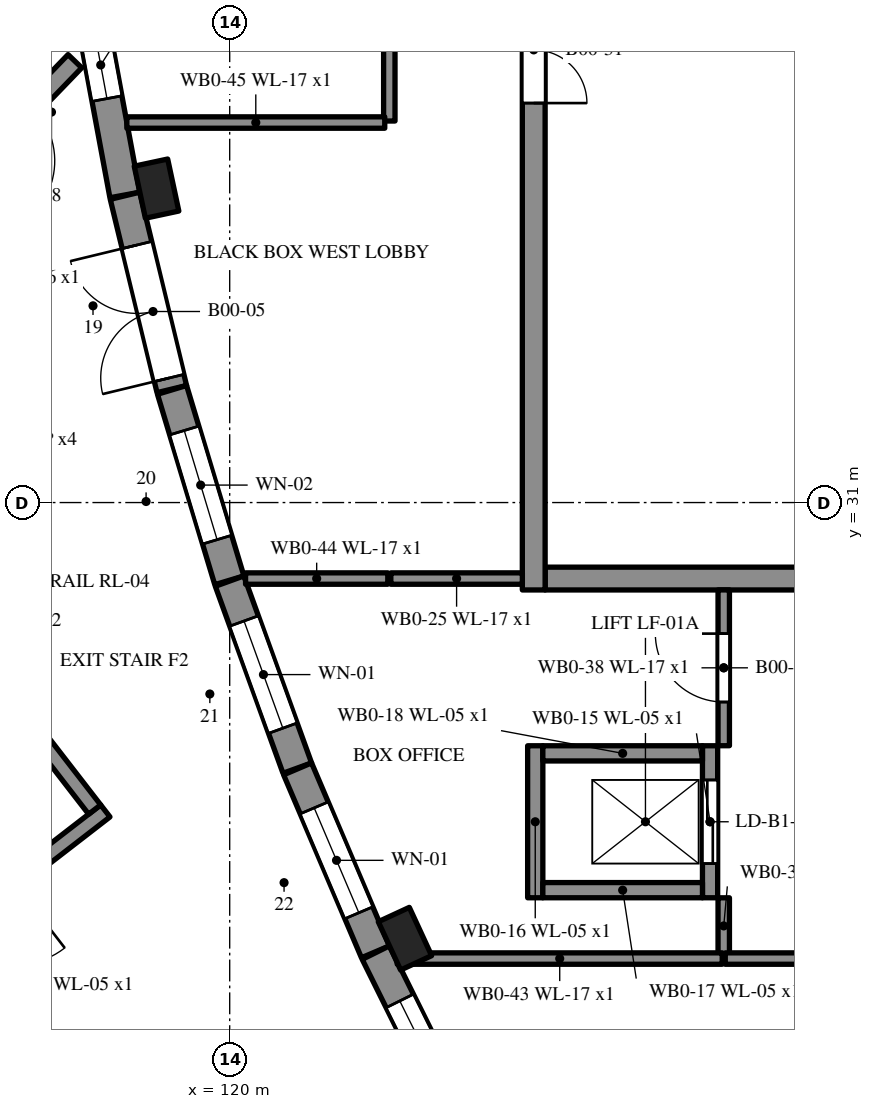
"""IFC4 building model, lengths in metres.
Left out: names, types, materials, properties, quantities, classifications, styles, units other than length and angle.
Written with IfcOpenShell. Run it as: python <this file> out.ifc"""

import sys

from ifc_helpers import new_model, si_unit, direction, frame, frame_2d, origin, origin_2d, place, context, subcontext, project, spatial, rectangle, extrude, element, fill, save


model = new_model("IFC4")
c1 = context("Model", 3, precision=1e-05, world=origin(), true_north=direction((0.0, 1.0)))
c2 = subcontext(c1, "Body", "Model", "MODEL_VIEW")
j1 = project(units=[si_unit("LENGTHUNIT", "METRE"), si_unit("PLANEANGLEUNIT", "RADIAN")], contexts=[c1])
p1 = place(None, origin())
s1 = spatial("IfcSite", under=j1, at=p1, CompositionType="ELEMENT")
p2 = place(p1, origin())
s2 = spatial("IfcBuilding", under=s1, at=p2, CompositionType="ELEMENT")
p3 = place(p2, origin())
s3 = spatial("IfcBuildingStorey", under=s2, at=p3, CompositionType="ELEMENT", Elevation=0.0)
p4 = place(p3, frame((118.165, 37.502, 0.0), z_axis=(0.0, 0.0, 1.0), x_axis=(0.182652956339, -0.983177449671, 0.0)))
e1 = element("IfcWall", 1, at=p4, inside=s3, PredefinedType="SOLIDWALL", context=c2, shape_type="SweptSolid", body=[
    extrude(rectangle(XDim=2.497, YDim=0.4, at=frame_2d((1.249, 0.0))), origin(), (0.0, 0.0, 1.0), 5.1),
])
p5 = place(p4, frame((0.307, 0.0, 0.9)))
e2 = element("IfcOpeningElement", 2, at=p5, cuts=e1, PredefinedType="OPENING", context=c2, shape_type="SweptSolid", body=[
    extrude(rectangle(XDim=0.9, YDim=2.1, at=frame_2d((0.45, 1.05))), frame((0.0, 0.21, 0.0), z_axis=(0.0, -1.0, 0.0), x_axis=(1.0, 0.0, 0.0)), (0.0, 0.0, 1.0), 0.42),
])
p6 = place(p3, frame((118.623, 35.037, 0.0), z_axis=(0.0, 0.0, 1.0), x_axis=(0.235108668597, -0.971969091047, 0.0)))
e3 = element("IfcWall", 3, at=p6, inside=s3, PredefinedType="SOLIDWALL", context=c2, shape_type="SweptSolid", body=[
    extrude(rectangle(XDim=2.617, YDim=0.4, at=frame_2d((1.308, 0.0))), origin(), (0.0, 0.0, 1.0), 5.1),
])
p7 = place(p6, frame((0.667, 0.0, 0.0)))
e4 = element("IfcOpeningElement", 4, at=p7, cuts=e3, PredefinedType="OPENING", context=c2, shape_type="SweptSolid", body=[
    extrude(rectangle(XDim=1.8, YDim=2.1, at=frame_2d((0.9, 1.05))), frame((0.0, 0.21, 0.0), z_axis=(0.0, -1.0, 0.0), x_axis=(1.0, 0.0, 0.0)), (0.0, 0.0, 1.0), 0.42),
])
p8 = place(p3, frame((119.241, 32.483, 0.0), z_axis=(0.0, 0.0, 1.0), x_axis=(0.288212317298, -0.957566530408, 0.0)))
e5 = element("IfcWall", 5, at=p8, inside=s3, PredefinedType="SOLIDWALL", context=c2, shape_type="SweptSolid", body=[
    extrude(rectangle(XDim=2.617, YDim=0.4, at=frame_2d((1.308, 0.0))), origin(), (0.0, 0.0, 1.0), 5.1),
])
p9 = place(p8, frame((0.558, 0.0, 0.3)))
e6 = element("IfcOpeningElement", 6, at=p9, cuts=e5, PredefinedType="OPENING", context=c2, shape_type="SweptSolid", body=[
    extrude(rectangle(XDim=1.5, YDim=2.7, at=frame_2d((0.75, 1.35))), frame((0.0, 0.21, 0.0), z_axis=(0.0, -1.0, 0.0), x_axis=(1.0, 0.0, 0.0)), (0.0, 0.0, 1.0), 0.42),
])
p10 = place(p3, frame((119.999, 29.967, 0.0), z_axis=(0.0, 0.0, 1.0), x_axis=(0.340394146267, -0.940282843184, 0.0)))
e7 = element("IfcWall", 7, at=p10, inside=s3, PredefinedType="SOLIDWALL", context=c2, shape_type="SweptSolid", body=[
    extrude(rectangle(XDim=2.616, YDim=0.4, at=frame_2d((1.308, 0.0))), origin(), (0.0, 0.0, 1.0), 5.1),
])
p11 = place(p10, frame((0.558, 0.0, 0.9)))
e8 = element("IfcOpeningElement", 8, at=p11, cuts=e7, PredefinedType="OPENING", context=c2, shape_type="SweptSolid", body=[
    extrude(rectangle(XDim=1.5, YDim=2.1, at=frame_2d((0.75, 1.05))), frame((0.0, 0.21, 0.0), z_axis=(0.0, -1.0, 0.0), x_axis=(1.0, 0.0, 0.0)), (0.0, 0.0, 1.0), 0.42),
])
p12 = place(p3, frame((120.893, 27.496, 0.0), z_axis=(0.0, 0.0, 1.0), x_axis=(0.391529943778, -0.920165367271, 0.0)))
e9 = element("IfcWall", 9, at=p12, inside=s3, PredefinedType="SOLIDWALL", context=c2, shape_type="SweptSolid", body=[
    extrude(rectangle(XDim=2.616, YDim=0.4, at=frame_2d((1.308, 0.0))), origin(), (0.0, 0.0, 1.0), 5.1),
])
p13 = place(p12, frame((0.558, 0.0, 0.9)))
e10 = element("IfcOpeningElement", 10, at=p13, cuts=e9, PredefinedType="OPENING", context=c2, shape_type="SweptSolid", body=[
    extrude(rectangle(XDim=1.5, YDim=2.1, at=frame_2d((0.75, 1.05))), frame((0.0, 0.21, 0.0), z_axis=(0.0, -1.0, 0.0), x_axis=(1.0, 0.0, 0.0)), (0.0, 0.0, 1.0), 0.42),
])
p14 = place(p3, frame((121.922, 25.078, 0.0), z_axis=(0.0, 0.0, 1.0), x_axis=(0.44433489597, -0.895860759395, 0.0)))
e11 = element("IfcWall", 11, at=p14, inside=s3, PredefinedType="SOLIDWALL", context=c2, shape_type="SweptSolid", body=[
    extrude(rectangle(XDim=2.92, YDim=0.4, at=frame_2d((1.46, 0.0))), origin(), (0.0, 0.0, 1.0), 5.1),
])
p15 = place(p14, frame((0.71, 0.0, 2.4)))
e12 = element("IfcOpeningElement", 12, at=p15, cuts=e11, PredefinedType="OPENING", context=c2, shape_type="SweptSolid", body=[
    extrude(rectangle(XDim=1.5, YDim=0.9, at=frame_2d((0.75, 0.45))), frame((0.0, 0.21, 0.0), z_axis=(0.0, -1.0, 0.0), x_axis=(1.0, 0.0, 0.0)), (0.0, 0.0, 1.0), 0.42),
])
for number, where, z_axis, x_axis in (
    (13, (122.306, 25.261, 0.0), (0.0, 0.0, 1.0), (0.42, -0.908, 0.0)),
    (14, (119.037, 35.131, 0.0), (0.0, 0.0, 1.0), (0.21, -0.978, 0.0)),
):
    element("IfcColumn", number, at=place(p3, frame(where, z_axis=z_axis, x_axis=x_axis)), inside=s3, PredefinedType="PILASTER", context=c2, shape_type="SweptSolid", body=[
        extrude(rectangle(XDim=0.7, YDim=0.45, at=origin_2d()), origin(), (0.0, 0.0, 1.0), 5.1),
    ])
p16 = place(p3, frame((139.85, 30.0, 0.0), z_axis=(0.0, 0.0, 1.0), x_axis=(-1.0, 0.0, 0.0)))
e15 = element("IfcWall", 15, at=p16, inside=s3, PredefinedType="SHEAR", context=c2, shape_type="SweptSolid", body=[
    extrude(rectangle(XDim=15.7, YDim=0.3, at=frame_2d((7.85, 0.0))), origin(), (0.0, 0.0, 1.0), 5.1),
])
p17 = place(p16, frame((6.95, 0.0, 0.0)))
e16 = element("IfcOpeningElement", 16, at=p17, cuts=e15, PredefinedType="OPENING", context=c2, shape_type="SweptSolid", body=[
    extrude(rectangle(XDim=1.8, YDim=2.1, at=frame_2d((0.9, 1.05))), frame((0.0, 0.16, 0.0), z_axis=(0.0, -1.0, 0.0), x_axis=(1.0, 0.0, 0.0)), (0.0, 0.0, 1.0), 0.32),
])
p18 = place(p3, frame((124.0, 62.15, 0.0), z_axis=(0.0, 0.0, 1.0), x_axis=(0.0, -1.0, 0.0)))
e17 = element("IfcWall", 17, at=p18, inside=s3, PredefinedType="SHEAR", context=c2, shape_type="SweptSolid", body=[
    extrude(rectangle(XDim=32.3, YDim=0.3, at=frame_2d((16.15, 0.0))), origin(), (0.0, 0.0, 1.0), 5.1),
])
p19 = place(p18, frame((6.406, 0.0, 0.0)))
e18 = element("IfcOpeningElement", 18, at=p19, cuts=e17, PredefinedType="OPENING", context=c2, shape_type="SweptSolid", body=[
    extrude(rectangle(XDim=1.4, YDim=2.1, at=frame_2d((0.7, 1.05))), frame((0.0, 0.16, 0.0), z_axis=(0.0, -1.0, 0.0), x_axis=(1.0, 0.0, 0.0)), (0.0, 0.0, 1.0), 0.32),
])
p20 = place(p18, frame((24.494, 0.0, 0.0)))
e19 = element("IfcOpeningElement", 19, at=p20, cuts=e17, PredefinedType="OPENING", context=c2, shape_type="SweptSolid", body=[
    extrude(rectangle(XDim=1.4, YDim=2.1, at=frame_2d((0.7, 1.05))), frame((0.0, 0.16, 0.0), z_axis=(0.0, -1.0, 0.0), x_axis=(1.0, 0.0, 0.0)), (0.0, 0.0, 1.0), 0.32),
])
p21 = place(p3, frame((126.32, 25.8, -1.2), z_axis=(0.0, 0.0, 1.0), x_axis=(0.0, 1.0, 0.0)))
e20 = element("IfcWall", 20, at=p21, inside=s3, PredefinedType="SHEAR", context=c2, shape_type="SweptSolid", body=[
    extrude(rectangle(XDim=2.0, YDim=0.2, at=frame_2d((1.0, 0.0))), origin(), (0.0, 0.0, 1.0), 6.3),
])
p22 = place(p21, frame((0.45, 0.0, 1.2)))
e21 = element("IfcOpeningElement", 21, at=p22, cuts=e20, PredefinedType="OPENING", context=c2, shape_type="SweptSolid", body=[
    extrude(rectangle(XDim=1.1, YDim=2.2, at=frame_2d((0.55, 1.1))), frame((0.0, 0.11, 0.0), z_axis=(0.0, -1.0, 0.0), x_axis=(1.0, 0.0, 0.0)), (0.0, 0.0, 1.0), 0.22),
])
p23 = place(p3, frame((124.02, 27.8, -1.2), z_axis=(0.0, 0.0, 1.0), x_axis=(0.0, -1.0, 0.0)))
e22 = element("IfcWall", 22, at=p23, inside=s3, PredefinedType="SHEAR", context=c2, shape_type="SweptSolid", body=[
    extrude(rectangle(XDim=2.0, YDim=0.2, at=frame_2d((1.0, 0.0))), origin(), (0.0, 0.0, 1.0), 6.3),
])
for number, where, z_axis, x_axis in (
    (23, (124.12, 25.9, -1.2), (0.0, 0.0, 1.0), (1.0, 0.0, 0.0)),
    (24, (126.22, 27.7, -1.2), (0.0, 0.0, 1.0), (-1.0, 0.0, 0.0)),
):
    element("IfcWall", number, at=place(p3, frame(where, z_axis=z_axis, x_axis=x_axis)), inside=s3, PredefinedType="SHEAR", context=c2, shape_type="SweptSolid", body=[
        extrude(rectangle(XDim=2.1, YDim=0.2, at=frame_2d((1.05, 0.0))), origin(), (0.0, 0.0, 1.0), 6.3),
    ])
p24 = place(p3, frame((117.963, 36.807, 0.0), z_axis=(0.0, 0.0, 1.0), x_axis=(-0.694251740415, -0.71973225642, 0.0)))
e25 = element("IfcWall", 25, at=p24, inside=s3, PredefinedType="SHEAR", context=c2, shape_type="SweptSolid", body=[
    extrude(rectangle(XDim=2.645, YDim=0.25, at=frame_2d((1.322, 0.0))), origin(), (0.0, 0.0, 1.0), 5.4),
])
p25 = place(p24, frame((0.822, 0.0, 0.0)))
e26 = element("IfcOpeningElement", 26, at=p25, cuts=e25, PredefinedType="OPENING", context=c2, shape_type="SweptSolid", body=[
    extrude(rectangle(XDim=1.0, YDim=2.1, at=frame_2d((0.5, 1.05))), frame((0.0, 0.135, 0.0), z_axis=(0.0, -1.0, 0.0), x_axis=(1.0, 0.0, 0.0)), (0.0, 0.0, 1.0), 0.27),
])
p26 = place(p3, frame((123.851, 30.0, 0.0), z_axis=(0.0, 0.0, 1.0), x_axis=(-1.0, 0.0, 0.0)))
e27 = element("IfcWall", 27, at=p26, inside=s3, PredefinedType="PARTITIONING", context=c2, shape_type="SweptSolid", body=[
    extrude(rectangle(XDim=1.73, YDim=0.15, at=frame_2d((0.865, 0.0))), origin(), (0.0, 0.0, 1.0), 5.1),
])
p27 = place(p3, frame((122.1, 36.02, 0.0), z_axis=(0.0, 0.0, 1.0), x_axis=(0.0, 1.0, 0.0)))
e28 = element("IfcWall", 28, at=p27, inside=s3, PredefinedType="PARTITIONING", context=c2, shape_type="SweptSolid", body=[
    extrude(rectangle(XDim=4.46, YDim=0.15, at=frame_2d((2.23, 0.0))), origin(), (0.0, 0.0, 1.0), 5.1),
])
p28 = place(p27, frame((1.78, 0.0, 0.0)))
e29 = element("IfcOpeningElement", 29, at=p28, cuts=e28, PredefinedType="OPENING", context=c2, shape_type="SweptSolid", body=[
    extrude(rectangle(XDim=0.9, YDim=2.1, at=frame_2d((0.45, 1.05))), frame((0.0, 0.085, 0.0), z_axis=(0.0, -1.0, 0.0), x_axis=(1.0, 0.0, 0.0)), (0.0, 0.0, 1.0), 0.17),
])
p29 = place(p3, frame((126.5, 25.06, 0.0), z_axis=(0.0, 0.0, 1.0), x_axis=(0.0, 1.0, 0.0)))
e30 = element("IfcWall", 30, at=p29, inside=s3, PredefinedType="PARTITIONING", context=c2, shape_type="SweptSolid", body=[
    extrude(rectangle(XDim=0.74, YDim=0.15, at=frame_2d((0.37, 0.0))), origin(), (0.0, 0.0, 1.0), 5.1),
])
p30 = place(p3, frame((126.5, 27.801, 0.0), z_axis=(0.0, 0.0, 1.0), x_axis=(0.0, 1.0, 0.0)))
e31 = element("IfcWall", 31, at=p30, inside=s3, PredefinedType="PARTITIONING", context=c2, shape_type="SweptSolid", body=[
    extrude(rectangle(XDim=2.05, YDim=0.15, at=frame_2d((1.025, 0.0))), origin(), (0.0, 0.0, 1.0), 5.1),
])
p31 = place(p30, frame((0.575, 0.0, 0.0)))
e32 = element("IfcOpeningElement", 32, at=p31, cuts=e31, PredefinedType="OPENING", context=c2, shape_type="SweptSolid", body=[
    extrude(rectangle(XDim=0.9, YDim=2.1, at=frame_2d((0.45, 1.05))), frame((0.0, 0.085, 0.0), z_axis=(0.0, -1.0, 0.0), x_axis=(1.0, 0.0, 0.0)), (0.0, 0.0, 1.0), 0.17),
])
p32 = place(p3, frame((129.65, 25.0, 0.0), z_axis=(0.0, 0.0, 1.0), x_axis=(-1.0, 0.0, 0.0)))
e33 = element("IfcWall", 33, at=p32, inside=s3, PredefinedType="PARTITIONING", context=c2, shape_type="SweptSolid", body=[
    extrude(rectangle(XDim=3.13, YDim=0.15, at=frame_2d((1.565, 0.0))), origin(), (0.0, 0.0, 1.0), 5.1),
])
p33 = place(p32, frame((1.065, 0.0, 0.0)))
e34 = element("IfcOpeningElement", 34, at=p33, cuts=e33, PredefinedType="OPENING", context=c2, shape_type="SweptSolid", body=[
    extrude(rectangle(XDim=1.0, YDim=2.1, at=frame_2d((0.5, 1.05))), frame((0.0, 0.085, 0.0), z_axis=(0.0, -1.0, 0.0), x_axis=(1.0, 0.0, 0.0)), (0.0, 0.0, 1.0), 0.17),
])
p34 = place(p3, frame((126.48, 25.0, 0.0), z_axis=(0.0, 0.0, 1.0), x_axis=(-1.0, 0.0, 0.0)))
e35 = element("IfcWall", 35, at=p34, inside=s3, PredefinedType="PARTITIONING", context=c2, shape_type="SweptSolid", body=[
    extrude(rectangle(XDim=4.276, YDim=0.15, at=frame_2d((2.138, 0.0))), origin(), (0.0, 0.0, 1.0), 5.1),
])
p35 = place(p3, frame((120.209, 30.0, 0.0), z_axis=(0.0, 0.0, 1.0), x_axis=(1.0, 0.0, 0.0)))
e36 = element("IfcWall", 36, at=p35, inside=s3, PredefinedType="PARTITIONING", context=c2, shape_type="SweptSolid", body=[
    extrude(rectangle(XDim=1.871, YDim=0.15, at=frame_2d((0.936, 0.0))), origin(), (0.0, 0.0, 1.0), 5.1),
])
p36 = place(p3, frame((118.647, 36.0, 0.0), z_axis=(0.0, 0.0, 1.0), x_axis=(1.0, 0.0, 0.0)))
e37 = element("IfcWall", 37, at=p36, inside=s3, PredefinedType="PARTITIONING", context=c2, shape_type="SweptSolid", body=[
    extrude(rectangle(XDim=3.393, YDim=0.15, at=frame_2d((1.697, 0.0))), origin(), (0.0, 0.0, 1.0), 5.1),
])
p37 = place(p3, frame((118.364, 26.943, 0.0), z_axis=(0.0, 0.0, 1.0), x_axis=(-0.791154317501, -0.611616584062, 0.0)))
e38 = element("IfcWall", 38, at=p37, inside=s3, PredefinedType="SHEAR", context=c2, shape_type="SweptSolid", body=[
    extrude(rectangle(XDim=4.15, YDim=0.2, at=frame_2d((2.075, 0.0))), origin(), (0.0, 0.0, 1.0), 5.4),
])
p38 = place(p37, frame((1.525, 0.0, 0.0)))
e39 = element("IfcOpeningElement", 39, at=p38, cuts=e38, PredefinedType="OPENING", context=c2, shape_type="SweptSolid", body=[
    extrude(rectangle(XDim=1.1, YDim=2.1, at=frame_2d((0.55, 1.05))), frame((0.0, 0.11, 0.0), z_axis=(0.0, -1.0, 0.0), x_axis=(1.0, 0.0, 0.0)), (0.0, 0.0, 1.0), 0.22),
])
p39 = place(p3, frame((118.223, 26.961, 0.0), z_axis=(0.0, 0.0, 1.0), x_axis=(-0.61163509056, 0.791140010362, 0.0)))
e40 = element("IfcWall", 40, at=p39, inside=s3, PredefinedType="SHEAR", context=c2, shape_type="SweptSolid", body=[
    extrude(rectangle(XDim=8.0, YDim=0.2, at=frame_2d((4.0, 0.0))), origin(), (0.0, 0.0, 1.0), 5.4),
])
p40 = place(p7, frame((1.8, 0.0, 0.0), z_axis=(0.0, 0.0, 1.0), x_axis=(-1.0, 0.0, 0.0)))
e41 = element("IfcDoor", 41, at=p40, inside=s3, OperationType="DOUBLE_DOOR_SINGLE_SWING", PredefinedType="DOOR", context=c2, shape_type="SweptSolid", body=[
    extrude(rectangle(XDim=1.8, YDim=2.1, at=frame_2d((0.9, 1.05))), frame((0.0, 0.025, 0.0), z_axis=(0.0, -1.0, 0.0), x_axis=(1.0, 0.0, 0.0)), (0.0, 0.0, 1.0), 0.05),
])
fill(e4, e41)
p41 = place(p5, origin())
e42 = element("IfcWindow", 42, at=p41, inside=s3, PartitioningType="SINGLE_PANEL", PredefinedType="WINDOW", context=c2, shape_type="SweptSolid", body=[
    extrude(rectangle(XDim=0.9, YDim=2.1, at=frame_2d((0.45, 1.05))), frame((0.0, 0.03, 0.0), z_axis=(0.0, -1.0, 0.0), x_axis=(1.0, 0.0, 0.0)), (0.0, 0.0, 1.0), 0.06),
])
fill(e2, e42)
p42 = place(p9, origin())
e43 = element("IfcWindow", 43, at=p42, inside=s3, PartitioningType="SINGLE_PANEL", PredefinedType="WINDOW", context=c2, shape_type="SweptSolid", body=[
    extrude(rectangle(XDim=1.5, YDim=2.7, at=frame_2d((0.75, 1.35))), frame((0.0, 0.03, 0.0), z_axis=(0.0, -1.0, 0.0), x_axis=(1.0, 0.0, 0.0)), (0.0, 0.0, 1.0), 0.06),
])
fill(e6, e43)
p43 = place(p11, origin())
e44 = element("IfcWindow", 44, at=p43, inside=s3, PartitioningType="SINGLE_PANEL", PredefinedType="WINDOW", context=c2, shape_type="SweptSolid", body=[
    extrude(rectangle(XDim=1.5, YDim=2.1, at=frame_2d((0.75, 1.05))), frame((0.0, 0.03, 0.0), z_axis=(0.0, -1.0, 0.0), x_axis=(1.0, 0.0, 0.0)), (0.0, 0.0, 1.0), 0.06),
])
fill(e8, e44)
p44 = place(p13, origin())
e45 = element("IfcWindow", 45, at=p44, inside=s3, PartitioningType="SINGLE_PANEL", PredefinedType="WINDOW", context=c2, shape_type="SweptSolid", body=[
    extrude(rectangle(XDim=1.5, YDim=2.1, at=frame_2d((0.75, 1.05))), frame((0.0, 0.03, 0.0), z_axis=(0.0, -1.0, 0.0), x_axis=(1.0, 0.0, 0.0)), (0.0, 0.0, 1.0), 0.06),
])
fill(e10, e45)
p45 = place(p15, origin())
e46 = element("IfcWindow", 46, at=p45, inside=s3, PartitioningType="SINGLE_PANEL", PredefinedType="WINDOW", context=c2, shape_type="SweptSolid", body=[
    extrude(rectangle(XDim=1.5, YDim=0.9, at=frame_2d((0.75, 0.45))), frame((0.0, 0.03, 0.0), z_axis=(0.0, -1.0, 0.0), x_axis=(1.0, 0.0, 0.0)), (0.0, 0.0, 1.0), 0.06),
])
fill(e12, e46)
p46 = place(p22, origin())
e47 = element("IfcDoor", 47, at=p46, inside=s3, OperationType="SLIDING_TO_LEFT", PredefinedType="DOOR", context=c2, shape_type="SweptSolid", body=[
    extrude(rectangle(XDim=1.1, YDim=2.2, at=frame_2d((0.55, 1.1))), frame((0.0, 0.025, 0.0), z_axis=(0.0, -1.0, 0.0), x_axis=(1.0, 0.0, 0.0)), (0.0, 0.0, 1.0), 0.05),
])
fill(e21, e47)
p47 = place(p31, origin())
e48 = element("IfcDoor", 48, at=p47, inside=s3, OperationType="SINGLE_SWING_RIGHT", PredefinedType="DOOR", context=c2, shape_type="SweptSolid", body=[
    extrude(rectangle(XDim=0.9, YDim=2.1, at=frame_2d((0.45, 1.05))), frame((0.0, 0.025, 0.0), z_axis=(0.0, -1.0, 0.0), x_axis=(1.0, 0.0, 0.0)), (0.0, 0.0, 1.0), 0.05),
])
fill(e32, e48)
p48 = place(p20, origin())
e49 = element("IfcDoor", 49, at=p48, inside=s3, OperationType="DOUBLE_DOOR_SINGLE_SWING", PredefinedType="DOOR", context=c2, shape_type="SweptSolid", body=[
    extrude(rectangle(XDim=1.4, YDim=2.1, at=frame_2d((0.7, 1.05))), frame((0.0, 0.025, 0.0), z_axis=(0.0, -1.0, 0.0), x_axis=(1.0, 0.0, 0.0)), (0.0, 0.0, 1.0), 0.05),
])
fill(e19, e49)
save(model, sys.argv[1])
